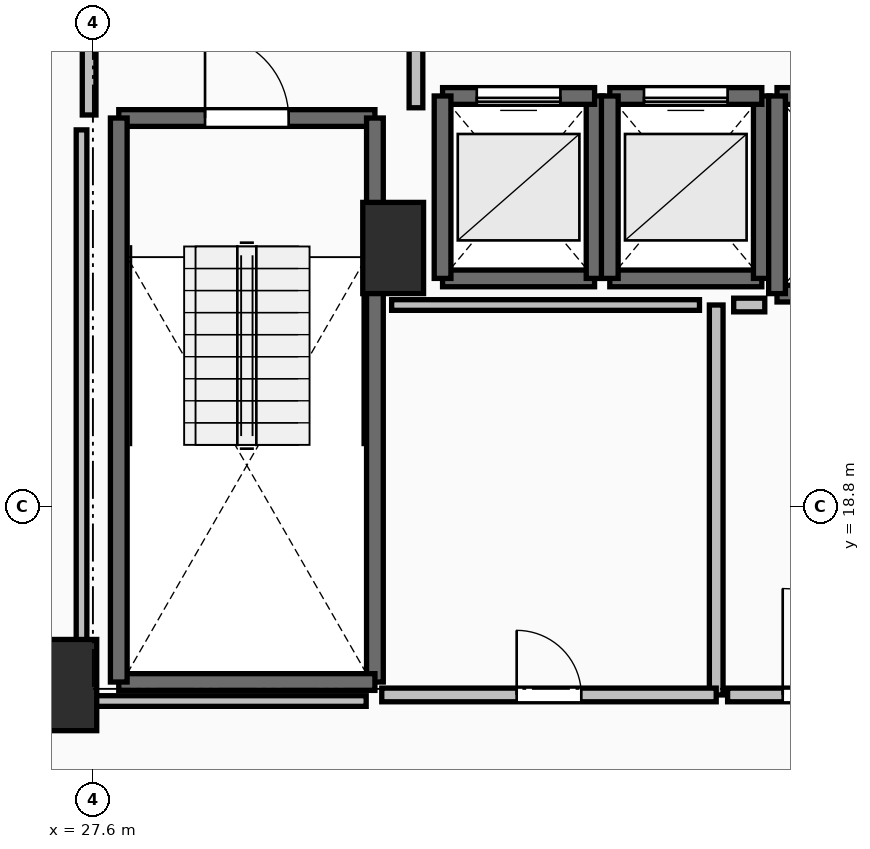
"""IFC4 building model, lengths in metres.
Left out: names, types, materials, properties, quantities, classifications, styles, units other than length and angle.
Written with IfcOpenShell. Run it as: python <this file> out.ifc"""

import sys

from ifc_helpers import new_model, si_unit, direction, frame, frame_2d, origin, origin_2d, place, context, subcontext, project, spatial, rectangle, extrude, element, fill, save


model = new_model("IFC4")
c1 = context("Model", 3, precision=1e-05, world=origin(), true_north=direction((0.0, 1.0)))
c2 = subcontext(c1, "Body", "Model", "MODEL_VIEW")
j1 = project(units=[si_unit("LENGTHUNIT", "METRE"), si_unit("PLANEANGLEUNIT", "RADIAN")], contexts=[c1])
p1 = place(None, origin())
s1 = spatial("IfcSite", under=j1, at=p1, CompositionType="ELEMENT")
p2 = place(p1, origin())
s2 = spatial("IfcBuilding", under=s1, at=p2, CompositionType="ELEMENT")
p3 = place(p2, frame((0.0, 0.0, 139.6)))
s3 = spatial("IfcBuildingStorey", under=s2, at=p3, CompositionType="ELEMENT", Elevation=139.6)
for number, where, z_axis, x_axis in (
    (1, (27.25, 16.45, 0.0), (0.0, 0.0, 1.0), (1.0, 0.0, 0.0)),
    (2, (31.55, 22.2, 0.0), (0.0, 0.0, 1.0), (1.0, 0.0, 0.0)),
):
    element("IfcColumn", number, at=place(p3, frame(where, z_axis=z_axis, x_axis=x_axis)), inside=s3, PredefinedType="PILASTER", context=c2, shape_type="SweptSolid", body=[
        extrude(rectangle(XDim=0.8, YDim=1.2, at=origin_2d()), origin(), (0.0, 0.0, 1.0), 3.5),
    ])
p4 = place(p3, frame((27.94, 23.91, 0.0), z_axis=(0.0, 0.0, 1.0), x_axis=(1.0, 0.0, 0.0)))
e3 = element("IfcWall", 3, at=p4, inside=s3, PredefinedType="SOLIDWALL", context=c2, shape_type="SweptSolid", body=[
    extrude(rectangle(XDim=3.37, YDim=0.22, at=frame_2d((1.685, 0.0))), origin(), (0.0, 0.0, 1.0), 3.24),
])
p5 = place(p4, frame((1.135, 0.0, 0.0)))
e4 = element("IfcOpeningElement", 4, at=p5, cuts=e3, PredefinedType="OPENING", context=c2, shape_type="SweptSolid", body=[
    extrude(rectangle(XDim=1.1, YDim=2.15, at=frame_2d((0.55, 1.075))), frame((0.0, 0.125, 0.0), z_axis=(0.0, -1.0, 0.0), x_axis=(1.0, 0.0, 0.0)), (0.0, 0.0, 1.0), 0.25),
])
p6 = place(p3, frame((31.31, 23.91, 0.0), z_axis=(0.0, 0.0, 1.0), x_axis=(0.0, -1.0, 0.0)))
e5 = element("IfcWall", 5, at=p6, inside=s3, PredefinedType="SOLIDWALL", context=c2, shape_type="SweptSolid", body=[
    extrude(rectangle(XDim=7.42, YDim=0.22, at=frame_2d((3.71, 0.0))), origin(), (0.0, 0.0, 1.0), 3.24),
])
p7 = place(p3, frame((31.31, 16.49, 0.0), z_axis=(0.0, 0.0, 1.0), x_axis=(-1.0, 0.0, 0.0)))
e6 = element("IfcWall", 6, at=p7, inside=s3, PredefinedType="SOLIDWALL", context=c2, shape_type="SweptSolid", body=[
    extrude(rectangle(XDim=3.37, YDim=0.22, at=frame_2d((1.685, 0.0))), origin(), (0.0, 0.0, 1.0), 3.24),
])
p8 = place(p3, frame((27.94, 16.49, 0.0), z_axis=(0.0, 0.0, 1.0), x_axis=(0.0, 1.0, 0.0)))
e7 = element("IfcWall", 7, at=p8, inside=s3, PredefinedType="SOLIDWALL", context=c2, shape_type="SweptSolid", body=[
    extrude(rectangle(XDim=7.42, YDim=0.22, at=frame_2d((3.71, 0.0))), origin(), (0.0, 0.0, 1.0), 3.24),
])
p9 = place(p3, frame((32.2, 21.8, 0.0), z_axis=(0.0, 0.0, 1.0), x_axis=(1.0, 0.0, 0.0)))
e8 = element("IfcWall", 8, at=p9, inside=s3, PredefinedType="SOLIDWALL", context=c2, shape_type="SweptSolid", body=[
    extrude(rectangle(XDim=2.0, YDim=0.22, at=frame_2d((1.0, 0.0))), origin(), (0.0, 0.0, 1.0), 3.24),
])
p10 = place(p3, frame((34.2, 21.8, 0.0), z_axis=(0.0, 0.0, 1.0), x_axis=(0.0, 1.0, 0.0)))
e9 = element("IfcWall", 9, at=p10, inside=s3, PredefinedType="SOLIDWALL", context=c2, shape_type="SweptSolid", body=[
    extrude(rectangle(XDim=2.4, YDim=0.22, at=frame_2d((1.2, 0.0))), origin(), (0.0, 0.0, 1.0), 3.24),
])
p11 = place(p3, frame((34.2, 24.2, 0.0), z_axis=(0.0, 0.0, 1.0), x_axis=(-1.0, 0.0, 0.0)))
e10 = element("IfcWall", 10, at=p11, inside=s3, PredefinedType="SOLIDWALL", context=c2, shape_type="SweptSolid", body=[
    extrude(rectangle(XDim=2.0, YDim=0.22, at=frame_2d((1.0, 0.0))), origin(), (0.0, 0.0, 1.0), 3.24),
])
p12 = place(p11, frame((0.45, 0.0, 0.0)))
e11 = element("IfcOpeningElement", 11, at=p12, cuts=e10, PredefinedType="OPENING", context=c2, shape_type="SweptSolid", body=[
    extrude(rectangle(XDim=1.1, YDim=2.2, at=frame_2d((0.55, 1.1))), frame((0.0, 0.125, 0.0), z_axis=(0.0, -1.0, 0.0), x_axis=(1.0, 0.0, 0.0)), (0.0, 0.0, 1.0), 0.25),
])
p13 = place(p3, frame((32.2, 24.2, 0.0), z_axis=(0.0, 0.0, 1.0), x_axis=(0.0, -1.0, 0.0)))
e12 = element("IfcWall", 12, at=p13, inside=s3, PredefinedType="SOLIDWALL", context=c2, shape_type="SweptSolid", body=[
    extrude(rectangle(XDim=2.4, YDim=0.22, at=frame_2d((1.2, 0.0))), origin(), (0.0, 0.0, 1.0), 3.24),
])
p14 = place(p3, frame((34.4, 21.8, 0.0), z_axis=(0.0, 0.0, 1.0), x_axis=(1.0, 0.0, 0.0)))
e13 = element("IfcWall", 13, at=p14, inside=s3, PredefinedType="SOLIDWALL", context=c2, shape_type="SweptSolid", body=[
    extrude(rectangle(XDim=2.0, YDim=0.22, at=frame_2d((1.0, 0.0))), origin(), (0.0, 0.0, 1.0), 3.24),
])
p15 = place(p3, frame((36.4, 21.8, 0.0), z_axis=(0.0, 0.0, 1.0), x_axis=(0.0, 1.0, 0.0)))
e14 = element("IfcWall", 14, at=p15, inside=s3, PredefinedType="SOLIDWALL", context=c2, shape_type="SweptSolid", body=[
    extrude(rectangle(XDim=2.4, YDim=0.22, at=frame_2d((1.2, 0.0))), origin(), (0.0, 0.0, 1.0), 3.24),
])
p16 = place(p3, frame((36.4, 24.2, 0.0), z_axis=(0.0, 0.0, 1.0), x_axis=(-1.0, 0.0, 0.0)))
e15 = element("IfcWall", 15, at=p16, inside=s3, PredefinedType="SOLIDWALL", context=c2, shape_type="SweptSolid", body=[
    extrude(rectangle(XDim=2.0, YDim=0.22, at=frame_2d((1.0, 0.0))), origin(), (0.0, 0.0, 1.0), 3.24),
])
p17 = place(p16, frame((0.45, 0.0, 0.0)))
e16 = element("IfcOpeningElement", 16, at=p17, cuts=e15, PredefinedType="OPENING", context=c2, shape_type="SweptSolid", body=[
    extrude(rectangle(XDim=1.1, YDim=2.2, at=frame_2d((0.55, 1.1))), frame((0.0, 0.125, 0.0), z_axis=(0.0, -1.0, 0.0), x_axis=(1.0, 0.0, 0.0)), (0.0, 0.0, 1.0), 0.25),
])
p18 = place(p3, frame((34.4, 24.2, 0.0), z_axis=(0.0, 0.0, 1.0), x_axis=(0.0, -1.0, 0.0)))
e17 = element("IfcWall", 17, at=p18, inside=s3, PredefinedType="SOLIDWALL", context=c2, shape_type="SweptSolid", body=[
    extrude(rectangle(XDim=2.4, YDim=0.22, at=frame_2d((1.2, 0.0))), origin(), (0.0, 0.0, 1.0), 3.24),
])
p19 = place(p3, frame((36.6, 21.6, 0.0), z_axis=(0.0, 0.0, 1.0), x_axis=(1.0, 0.0, 0.0)))
e18 = element("IfcWall", 18, at=p19, inside=s3, PredefinedType="SOLIDWALL", context=c2, shape_type="SweptSolid", body=[
    extrude(rectangle(XDim=2.2, YDim=0.22, at=frame_2d((1.1, 0.0))), origin(), (0.0, 0.0, 1.0), 3.24),
])
p20 = place(p3, frame((38.8, 24.2, 0.0), z_axis=(0.0, 0.0, 1.0), x_axis=(-1.0, 0.0, 0.0)))
e19 = element("IfcWall", 19, at=p20, inside=s3, PredefinedType="SOLIDWALL", context=c2, shape_type="SweptSolid", body=[
    extrude(rectangle(XDim=2.2, YDim=0.22, at=frame_2d((1.1, 0.0))), origin(), (0.0, 0.0, 1.0), 3.24),
])
p21 = place(p20, frame((0.55, 0.0, 0.0)))
e20 = element("IfcOpeningElement", 20, at=p21, cuts=e19, PredefinedType="OPENING", context=c2, shape_type="SweptSolid", body=[
    extrude(rectangle(XDim=1.1, YDim=2.2, at=frame_2d((0.55, 1.1))), frame((0.0, 0.125, 0.0), z_axis=(0.0, -1.0, 0.0), x_axis=(1.0, 0.0, 0.0)), (0.0, 0.0, 1.0), 0.25),
])
p22 = place(p3, frame((36.6, 24.2, 0.0), z_axis=(0.0, 0.0, 1.0), x_axis=(0.0, -1.0, 0.0)))
e21 = element("IfcWall", 21, at=p22, inside=s3, PredefinedType="SOLIDWALL", context=c2, shape_type="SweptSolid", body=[
    extrude(rectangle(XDim=2.6, YDim=0.22, at=frame_2d((1.3, 0.0))), origin(), (0.0, 0.0, 1.0), 3.24),
])
p23 = place(p3, frame((31.85, 24.045, 0.0), z_axis=(0.0, 0.0, 1.0), x_axis=(0.0, 1.0, 0.0)))
e22 = element("IfcWall", 22, at=p23, inside=s3, PredefinedType="PARTITIONING", context=c2, shape_type="SweptSolid", body=[
    extrude(rectangle(XDim=3.91, YDim=0.18, at=frame_2d((1.955, 0.0))), origin(), (0.0, 0.0, 1.0), 3.24),
])
p24 = place(p23, frame((1.355, 0.0, 0.0)))
e23 = element("IfcOpeningElement", 23, at=p24, cuts=e22, PredefinedType="OPENING", context=c2, shape_type="SweptSolid", body=[
    extrude(rectangle(XDim=1.2, YDim=2.15, at=frame_2d((0.6, 1.075))), frame((0.0, 0.105, 0.0), z_axis=(0.0, -1.0, 0.0), x_axis=(1.0, 0.0, 0.0)), (0.0, 0.0, 1.0), 0.21),
])
p25 = place(p3, frame((27.55, 28.0, 0.0), z_axis=(0.0, 0.0, 1.0), x_axis=(0.0, -1.0, 0.0)))
e24 = element("IfcWall", 24, at=p25, inside=s3, PredefinedType="PARTITIONING", context=c2, shape_type="SweptSolid", body=[
    extrude(rectangle(XDim=4.05, YDim=0.18, at=frame_2d((2.025, 0.0))), origin(), (0.0, 0.0, 1.0), 3.24),
])
p26 = place(p25, frame((1.425, 0.0, 0.0)))
e25 = element("IfcOpeningElement", 25, at=p26, cuts=e24, PredefinedType="OPENING", context=c2, shape_type="SweptSolid", body=[
    extrude(rectangle(XDim=1.2, YDim=2.15, at=frame_2d((0.6, 1.075))), frame((0.0, 0.105, 0.0), z_axis=(0.0, -1.0, 0.0), x_axis=(1.0, 0.0, 0.0)), (0.0, 0.0, 1.0), 0.21),
])
p27 = place(p3, frame((35.8, 16.32, 0.0), z_axis=(0.0, 0.0, 1.0), x_axis=(0.0, 1.0, 0.0)))
e26 = element("IfcWall", 26, at=p27, inside=s3, PredefinedType="PARTITIONING", context=c2, shape_type="SweptSolid", body=[
    extrude(rectangle(XDim=5.13, YDim=0.18, at=frame_2d((2.565, 0.0))), origin(), (0.0, 0.0, 1.0), 3.24),
])
p28 = place(p3, frame((31.4, 16.32, 0.0), z_axis=(0.0, 0.0, 1.0), x_axis=(1.0, 0.0, 0.0)))
e27 = element("IfcWall", 27, at=p28, inside=s3, PredefinedType="PARTITIONING", context=c2, shape_type="SweptSolid", body=[
    extrude(rectangle(XDim=4.4, YDim=0.18, at=frame_2d((2.2, 0.0))), origin(), (0.0, 0.0, 1.0), 3.24),
])
p29 = place(p28, frame((1.775, 0.0, 0.0)))
e28 = element("IfcOpeningElement", 28, at=p29, cuts=e27, PredefinedType="OPENING", context=c2, shape_type="SweptSolid", body=[
    extrude(rectangle(XDim=0.85, YDim=2.1, at=frame_2d((0.425, 1.05))), frame((0.0, 0.105, 0.0), z_axis=(0.0, -1.0, 0.0), x_axis=(1.0, 0.0, 0.0)), (0.0, 0.0, 1.0), 0.21),
])
p30 = place(p3, frame((35.95, 16.32, 0.0), z_axis=(0.0, 0.0, 1.0), x_axis=(1.0, 0.0, 0.0)))
e29 = element("IfcWall", 29, at=p30, inside=s3, PredefinedType="PARTITIONING", context=c2, shape_type="SweptSolid", body=[
    extrude(rectangle(XDim=2.85, YDim=0.18, at=frame_2d((1.425, 0.0))), origin(), (0.0, 0.0, 1.0), 3.24),
])
p31 = place(p30, frame((0.725, 0.0, 0.0)))
e30 = element("IfcOpeningElement", 30, at=p31, cuts=e29, PredefinedType="OPENING", context=c2, shape_type="SweptSolid", body=[
    extrude(rectangle(XDim=1.4, YDim=2.2, at=frame_2d((0.7, 1.1))), frame((0.0, 0.105, 0.0), z_axis=(0.0, -1.0, 0.0), x_axis=(1.0, 0.0, 0.0)), (0.0, 0.0, 1.0), 0.21),
])
p32 = place(p3, frame((35.58, 21.45, 0.0), z_axis=(0.0, 0.0, 1.0), x_axis=(-1.0, 0.0, 0.0)))
e31 = element("IfcWall", 31, at=p32, inside=s3, PredefinedType="PARTITIONING", context=c2, shape_type="SweptSolid", body=[
    extrude(rectangle(XDim=4.05, YDim=0.14, at=frame_2d((2.025, 0.0))), origin(), (0.0, 0.0, 1.0), 3.24),
])
p33 = place(p3, frame((36.439, 21.45, 0.0), z_axis=(0.0, 0.0, 1.0), x_axis=(-1.0, 0.0, 0.0)))
e32 = element("IfcWall", 32, at=p33, inside=s3, PredefinedType="PARTITIONING", context=c2, shape_type="SweptSolid", body=[
    extrude(rectangle(XDim=0.409, YDim=0.18, at=frame_2d((0.205, 0.0))), origin(), (0.0, 0.0, 1.0), 3.24),
])
p34 = place(p3, frame((27.45, 23.754, 0.0), z_axis=(0.0, 0.0, 1.0), x_axis=(0.0, -1.0, 0.0)))
e33 = element("IfcWall", 33, at=p34, inside=s3, PredefinedType="PARTITIONING", context=c2, shape_type="SweptSolid", body=[
    extrude(rectangle(XDim=7.514, YDim=0.14, at=frame_2d((3.757, 0.0))), origin(), (0.0, 0.0, 1.0), 2.432),
])
p35 = place(p3, frame((27.45, 16.24, 0.0), z_axis=(0.0, 0.0, 1.0), x_axis=(1.0, 0.0, 0.0)))
e34 = element("IfcWall", 34, at=p35, inside=s3, PredefinedType="PARTITIONING", context=c2, shape_type="SweptSolid", body=[
    extrude(rectangle(XDim=3.745, YDim=0.14, at=frame_2d((1.873, 0.0))), origin(), (0.0, 0.0, 1.0), 2.432),
])
p36 = place(p5, origin())
e35 = element("IfcDoor", 35, at=p36, inside=s3, OperationType="SINGLE_SWING_LEFT", PredefinedType="DOOR", context=c2, shape_type="SweptSolid", body=[
    extrude(rectangle(XDim=1.1, YDim=2.15, at=frame_2d((0.55, 1.075))), frame((0.0, 0.025, 0.0), z_axis=(0.0, -1.0, 0.0), x_axis=(1.0, 0.0, 0.0)), (0.0, 0.0, 1.0), 0.05),
])
fill(e4, e35)
p37 = place(p12, origin())
e36 = element("IfcDoor", 36, at=p37, inside=s3, OperationType="SLIDING_TO_LEFT", PredefinedType="DOOR", context=c2, shape_type="SweptSolid", body=[
    extrude(rectangle(XDim=1.1, YDim=2.2, at=frame_2d((0.55, 1.1))), frame((0.0, 0.025, 0.0), z_axis=(0.0, -1.0, 0.0), x_axis=(1.0, 0.0, 0.0)), (0.0, 0.0, 1.0), 0.05),
])
fill(e11, e36)
p38 = place(p17, origin())
e37 = element("IfcDoor", 37, at=p38, inside=s3, OperationType="SLIDING_TO_LEFT", PredefinedType="DOOR", context=c2, shape_type="SweptSolid", body=[
    extrude(rectangle(XDim=1.1, YDim=2.2, at=frame_2d((0.55, 1.1))), frame((0.0, 0.025, 0.0), z_axis=(0.0, -1.0, 0.0), x_axis=(1.0, 0.0, 0.0)), (0.0, 0.0, 1.0), 0.05),
])
fill(e16, e37)
p39 = place(p29, origin())
e38 = element("IfcDoor", 38, at=p39, inside=s3, OperationType="SINGLE_SWING_LEFT", PredefinedType="DOOR", context=c2, shape_type="SweptSolid", body=[
    extrude(rectangle(XDim=0.85, YDim=2.1, at=frame_2d((0.425, 1.05))), frame((0.0, 0.025, 0.0), z_axis=(0.0, -1.0, 0.0), x_axis=(1.0, 0.0, 0.0)), (0.0, 0.0, 1.0), 0.05),
])
fill(e28, e38)
p40 = place(p31, origin())
e39 = element("IfcDoor", 39, at=p40, inside=s3, OperationType="DOUBLE_SWING_LEFT", PredefinedType="DOOR", context=c2, shape_type="SweptSolid", body=[
    extrude(rectangle(XDim=1.4, YDim=2.2, at=frame_2d((0.7, 1.1))), frame((0.0, 0.025, 0.0), z_axis=(0.0, -1.0, 0.0), x_axis=(1.0, 0.0, 0.0)), (0.0, 0.0, 1.0), 0.05),
])
fill(e30, e39)
save(model, sys.argv[1])
